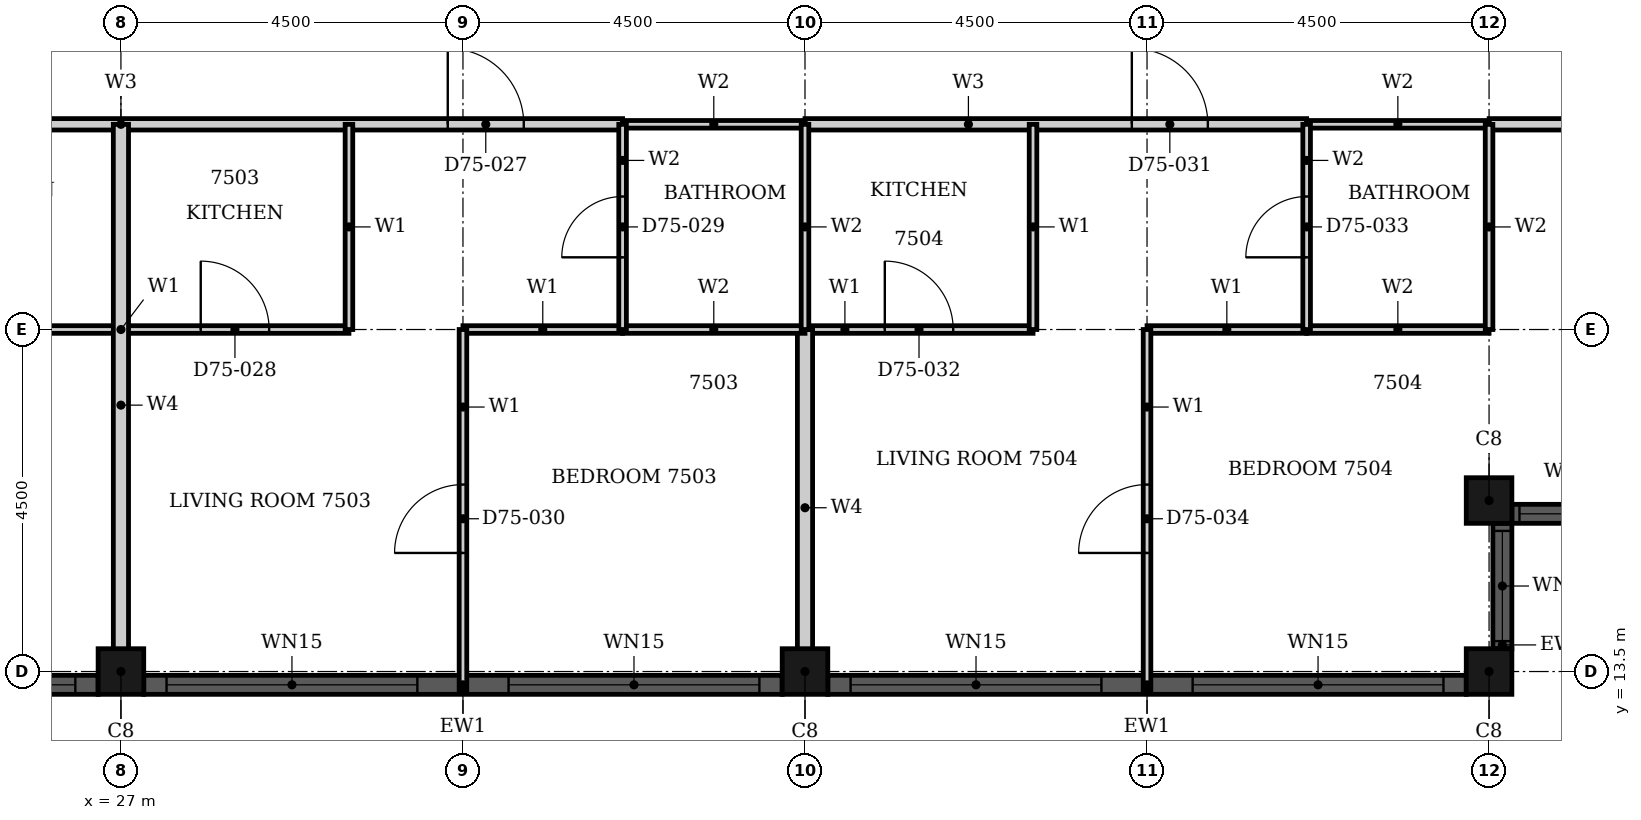
"""IFC4 building model, lengths in metres.
Left out: names, types, materials, properties, quantities, classifications, styles, units other than length and angle.
Written with IfcOpenShell. Run it as: python <this file> out.ifc"""

import sys

from ifc_helpers import new_model, si_unit, direction, frame, frame_2d, origin, origin_2d, place, context, subcontext, project, spatial, rectangle, hollow_rectangle, extrude, element, fill, save


model = new_model("IFC4")
c1 = context("Model", 3, precision=1e-05, world=origin(), true_north=direction((0.0, 1.0)))
c2 = subcontext(c1, "Body", "Model", "MODEL_VIEW")
j1 = project(units=[si_unit("LENGTHUNIT", "METRE"), si_unit("PLANEANGLEUNIT", "RADIAN")], contexts=[c1])
p1 = place(None, origin())
s1 = spatial("IfcSite", under=j1, at=p1, CompositionType="ELEMENT")
p2 = place(p1, origin())
s2 = spatial("IfcBuilding", under=s1, at=p2, CompositionType="ELEMENT")
p3 = place(p2, frame((0.0, 0.0, 294.5)))
s3 = spatial("IfcBuildingStorey", under=s2, at=p3, CompositionType="ELEMENT", Elevation=294.5)
for number, where, z_axis, x_axis in (
    (1, (45.0, 13.5, 0.0), (0.0, 0.0, 1.0), (1.0, 0.0, 0.0)),
    (2, (45.0, 15.75, 0.0), (0.0, 0.0, 1.0), (1.0, 0.0, 0.0)),
    (3, (27.0, 13.5, 0.0), (0.0, 0.0, 1.0), (1.0, 0.0, 0.0)),
    (4, (36.0, 13.5, 0.0), (0.0, 0.0, 1.0), (1.0, 0.0, 0.0)),
):
    element("IfcColumn", number, at=place(p3, frame(where, z_axis=z_axis, x_axis=x_axis)), inside=s3, PredefinedType="COLUMN", context=c2, shape_type="SweptSolid", body=[
        extrude(hollow_rectangle(XDim=0.6, YDim=0.6, WallThickness=0.02, at=origin_2d()), origin(), (0.0, 0.0, 1.0), 3.7),
    ])
p4 = place(p3, frame((45.175, 13.8, 0.0), z_axis=(0.0, 0.0, 1.0), x_axis=(0.0, 1.0, 0.0)))
e5 = element("IfcWall", 5, at=p4, inside=s3, PredefinedType="SOLIDWALL", context=c2, shape_type="SweptSolid", body=[
    extrude(rectangle(XDim=1.65, YDim=0.25, at=frame_2d((0.825, 0.0))), origin(), (0.0, 0.0, 1.0), 3.7),
])
p5 = place(p4, frame((0.1, 0.0, 0.9)))
e6 = element("IfcOpeningElement", 6, at=p5, cuts=e5, PredefinedType="OPENING", context=c2, shape_type="SweptSolid", body=[
    extrude(rectangle(XDim=1.45, YDim=1.85, at=frame_2d((0.725, 0.925))), frame((0.0, 0.135, 0.0), z_axis=(0.0, -1.0, 0.0), x_axis=(1.0, 0.0, 0.0)), (0.0, 0.0, 1.0), 0.27),
])
p6 = place(p3, frame((45.3, 15.575, 0.0), z_axis=(0.0, 0.0, 1.0), x_axis=(1.0, 0.0, 0.0)))
e7 = element("IfcWall", 7, at=p6, inside=s3, PredefinedType="SOLIDWALL", context=c2, shape_type="SweptSolid", body=[
    extrude(rectangle(XDim=1.65, YDim=0.25, at=frame_2d((0.825, 0.0))), origin(), (0.0, 0.0, 1.0), 3.7),
])
p7 = place(p6, frame((0.1, 0.0, 0.9)))
e8 = element("IfcOpeningElement", 8, at=p7, cuts=e7, PredefinedType="OPENING", context=c2, shape_type="SweptSolid", body=[
    extrude(rectangle(XDim=1.45, YDim=1.85, at=frame_2d((0.725, 0.925))), frame((0.0, 0.135, 0.0), z_axis=(0.0, -1.0, 0.0), x_axis=(1.0, 0.0, 0.0)), (0.0, 0.0, 1.0), 0.27),
])
p8 = place(p3, frame((18.3, 13.325, 0.0), z_axis=(0.0, 0.0, 1.0), x_axis=(1.0, 0.0, 0.0)))
e9 = element("IfcWall", 9, at=p8, inside=s3, PredefinedType="SOLIDWALL", context=c2, shape_type="SweptSolid", body=[
    extrude(rectangle(XDim=8.4, YDim=0.25, at=frame_2d((4.2, 0.0))), origin(), (0.0, 0.0, 1.0), 3.7),
])
p9 = place(p8, frame((0.3, 0.0, 0.45)))
e10 = element("IfcOpeningElement", 10, at=p9, cuts=e9, PredefinedType="OPENING", context=c2, shape_type="SweptSolid", body=[
    extrude(rectangle(XDim=3.3, YDim=2.3, at=frame_2d((1.65, 1.15))), frame((0.0, 0.135, 0.0), z_axis=(0.0, -1.0, 0.0), x_axis=(1.0, 0.0, 0.0)), (0.0, 0.0, 1.0), 0.27),
])
p10 = place(p8, frame((4.8, 0.0, 0.45)))
e11 = element("IfcOpeningElement", 11, at=p10, cuts=e9, PredefinedType="OPENING", context=c2, shape_type="SweptSolid", body=[
    extrude(rectangle(XDim=3.3, YDim=2.3, at=frame_2d((1.65, 1.15))), frame((0.0, 0.135, 0.0), z_axis=(0.0, -1.0, 0.0), x_axis=(1.0, 0.0, 0.0)), (0.0, 0.0, 1.0), 0.27),
])
p11 = place(p3, frame((27.3, 13.325, 0.0), z_axis=(0.0, 0.0, 1.0), x_axis=(1.0, 0.0, 0.0)))
e12 = element("IfcWall", 12, at=p11, inside=s3, PredefinedType="SOLIDWALL", context=c2, shape_type="SweptSolid", body=[
    extrude(rectangle(XDim=8.4, YDim=0.25, at=frame_2d((4.2, 0.0))), origin(), (0.0, 0.0, 1.0), 3.7),
])
p12 = place(p11, frame((0.3, 0.0, 0.45)))
e13 = element("IfcOpeningElement", 13, at=p12, cuts=e12, PredefinedType="OPENING", context=c2, shape_type="SweptSolid", body=[
    extrude(rectangle(XDim=3.3, YDim=2.3, at=frame_2d((1.65, 1.15))), frame((0.0, 0.135, 0.0), z_axis=(0.0, -1.0, 0.0), x_axis=(1.0, 0.0, 0.0)), (0.0, 0.0, 1.0), 0.27),
])
p13 = place(p11, frame((4.8, 0.0, 0.45)))
e14 = element("IfcOpeningElement", 14, at=p13, cuts=e12, PredefinedType="OPENING", context=c2, shape_type="SweptSolid", body=[
    extrude(rectangle(XDim=3.3, YDim=2.3, at=frame_2d((1.65, 1.15))), frame((0.0, 0.135, 0.0), z_axis=(0.0, -1.0, 0.0), x_axis=(1.0, 0.0, 0.0)), (0.0, 0.0, 1.0), 0.27),
])
p14 = place(p3, frame((36.3, 13.325, 0.0), z_axis=(0.0, 0.0, 1.0), x_axis=(1.0, 0.0, 0.0)))
e15 = element("IfcWall", 15, at=p14, inside=s3, PredefinedType="SOLIDWALL", context=c2, shape_type="SweptSolid", body=[
    extrude(rectangle(XDim=8.4, YDim=0.25, at=frame_2d((4.2, 0.0))), origin(), (0.0, 0.0, 1.0), 3.7),
])
p15 = place(p14, frame((0.3, 0.0, 0.45)))
e16 = element("IfcOpeningElement", 16, at=p15, cuts=e15, PredefinedType="OPENING", context=c2, shape_type="SweptSolid", body=[
    extrude(rectangle(XDim=3.3, YDim=2.3, at=frame_2d((1.65, 1.15))), frame((0.0, 0.135, 0.0), z_axis=(0.0, -1.0, 0.0), x_axis=(1.0, 0.0, 0.0)), (0.0, 0.0, 1.0), 0.27),
])
p16 = place(p14, frame((4.8, 0.0, 0.45)))
e17 = element("IfcOpeningElement", 17, at=p16, cuts=e15, PredefinedType="OPENING", context=c2, shape_type="SweptSolid", body=[
    extrude(rectangle(XDim=3.3, YDim=2.3, at=frame_2d((1.65, 1.15))), frame((0.0, 0.135, 0.0), z_axis=(0.0, -1.0, 0.0), x_axis=(1.0, 0.0, 0.0)), (0.0, 0.0, 1.0), 0.27),
])
p17 = place(p3, frame((20.4, 20.7, 0.0), z_axis=(0.0, 0.0, 1.0), x_axis=(1.0, 0.0, 0.0)))
e18 = element("IfcWall", 18, at=p17, inside=s3, PredefinedType="PARTITIONING", context=c2, shape_type="SweptSolid", body=[
    extrude(rectangle(XDim=13.2, YDim=0.15, at=frame_2d((6.6, 0.0))), origin(), (0.0, 0.0, 1.0), 3.4),
])
p18 = place(p17, frame((1.3, 0.0, 0.0)))
e19 = element("IfcOpeningElement", 19, at=p18, cuts=e18, PredefinedType="OPENING", context=c2, shape_type="SweptSolid", body=[
    extrude(rectangle(XDim=1.0, YDim=2.2, at=frame_2d((0.5, 1.1))), frame((0.0, 0.085, 0.0), z_axis=(0.0, -1.0, 0.0), x_axis=(1.0, 0.0, 0.0)), (0.0, 0.0, 1.0), 0.17),
])
p19 = place(p17, frame((10.9, 0.0, 0.0)))
e20 = element("IfcOpeningElement", 20, at=p19, cuts=e18, PredefinedType="OPENING", context=c2, shape_type="SweptSolid", body=[
    extrude(rectangle(XDim=1.0, YDim=2.2, at=frame_2d((0.5, 1.1))), frame((0.0, 0.085, 0.0), z_axis=(0.0, -1.0, 0.0), x_axis=(1.0, 0.0, 0.0)), (0.0, 0.0, 1.0), 0.17),
])
p20 = place(p3, frame((45.001, 20.7, 0.0), z_axis=(0.0, 0.0, 1.0), x_axis=(1.0, 0.0, 0.0)))
e21 = element("IfcWall", 21, at=p20, inside=s3, PredefinedType="PARTITIONING", context=c2, shape_type="SweptSolid", body=[
    extrude(rectangle(XDim=4.549, YDim=0.15, at=frame_2d((2.274, 0.0))), origin(), (0.0, 0.0, 1.0), 3.4),
])
p21 = place(p3, frame((36.0, 20.7, 0.0), z_axis=(0.0, 0.0, 1.0), x_axis=(1.0, 0.0, 0.0)))
e22 = element("IfcWall", 22, at=p21, inside=s3, PredefinedType="PARTITIONING", context=c2, shape_type="SweptSolid", body=[
    extrude(rectangle(XDim=6.6, YDim=0.15, at=frame_2d((3.3, 0.0))), origin(), (0.0, 0.0, 1.0), 3.4),
])
p22 = place(p21, frame((4.3, 0.0, 0.0)))
e23 = element("IfcOpeningElement", 23, at=p22, cuts=e22, PredefinedType="OPENING", context=c2, shape_type="SweptSolid", body=[
    extrude(rectangle(XDim=1.0, YDim=2.2, at=frame_2d((0.5, 1.1))), frame((0.0, 0.085, 0.0), z_axis=(0.0, -1.0, 0.0), x_axis=(1.0, 0.0, 0.0)), (0.0, 0.0, 1.0), 0.17),
])
p23 = place(p3, frame((24.0, 18.0, 0.0), z_axis=(0.0, 0.0, 1.0), x_axis=(1.0, 0.0, 0.0)))
e24 = element("IfcWall", 24, at=p23, inside=s3, PredefinedType="PARTITIONING", context=c2, shape_type="SweptSolid", body=[
    extrude(rectangle(XDim=6.0, YDim=0.1, at=frame_2d((3.0, 0.0))), origin(), (0.0, 0.0, 1.0), 3.4),
])
p24 = place(p23, frame((1.05, 0.0, 0.0)))
e25 = element("IfcOpeningElement", 25, at=p24, cuts=e24, PredefinedType="OPENING", context=c2, shape_type="SweptSolid", body=[
    extrude(rectangle(XDim=0.9, YDim=2.1, at=frame_2d((0.45, 1.05))), frame((0.0, 0.06, 0.0), z_axis=(0.0, -1.0, 0.0), x_axis=(1.0, 0.0, 0.0)), (0.0, 0.0, 1.0), 0.12),
])
p25 = place(p23, frame((4.05, 0.0, 0.0)))
e26 = element("IfcOpeningElement", 26, at=p25, cuts=e24, PredefinedType="OPENING", context=c2, shape_type="SweptSolid", body=[
    extrude(rectangle(XDim=0.9, YDim=2.1, at=frame_2d((0.45, 1.05))), frame((0.0, 0.06, 0.0), z_axis=(0.0, -1.0, 0.0), x_axis=(1.0, 0.0, 0.0)), (0.0, 0.0, 1.0), 0.12),
])
for number, where, z_axis, x_axis in (
    (27, (31.5, 18.0, 0.0), (0.0, 0.0, 1.0), (1.0, 0.0, 0.0)),
    (28, (40.5, 18.0, 0.0), (0.0, 0.0, 1.0), (1.0, 0.0, 0.0)),
):
    element("IfcWall", number, at=place(p3, frame(where, z_axis=z_axis, x_axis=x_axis)), inside=s3, PredefinedType="PARTITIONING", context=c2, shape_type="SweptSolid", body=[
        extrude(rectangle(XDim=2.1, YDim=0.1, at=frame_2d((1.05, 0.0))), origin(), (0.0, 0.0, 1.0), 3.4),
    ])
p26 = place(p3, frame((36.0, 18.0, 0.0), z_axis=(0.0, 0.0, 1.0), x_axis=(1.0, 0.0, 0.0)))
e29 = element("IfcWall", 29, at=p26, inside=s3, PredefinedType="PARTITIONING", context=c2, shape_type="SweptSolid", body=[
    extrude(rectangle(XDim=3.0, YDim=0.1, at=frame_2d((1.5, 0.0))), origin(), (0.0, 0.0, 1.0), 3.4),
])
p27 = place(p26, frame((1.05, 0.0, 0.0)))
e30 = element("IfcOpeningElement", 30, at=p27, cuts=e29, PredefinedType="OPENING", context=c2, shape_type="SweptSolid", body=[
    extrude(rectangle(XDim=0.9, YDim=2.1, at=frame_2d((0.45, 1.05))), frame((0.0, 0.06, 0.0), z_axis=(0.0, -1.0, 0.0), x_axis=(1.0, 0.0, 0.0)), (0.0, 0.0, 1.0), 0.12),
])
p28 = place(p3, frame((30.0, 18.0, 0.0), z_axis=(0.0, 0.0, 1.0), x_axis=(0.0, 1.0, 0.0)))
e31 = element("IfcWall", 31, at=p28, inside=s3, PredefinedType="PARTITIONING", context=c2, shape_type="SweptSolid", body=[
    extrude(rectangle(XDim=2.7, YDim=0.1, at=frame_2d((1.35, 0.0))), origin(), (0.0, 0.0, 1.0), 3.4),
])
p29 = place(p3, frame((31.5, 13.26, 0.0), z_axis=(0.0, 0.0, 1.0), x_axis=(0.0, 1.0, 0.0)))
e32 = element("IfcWall", 32, at=p29, inside=s3, PredefinedType="PARTITIONING", context=c2, shape_type="SweptSolid", body=[
    extrude(rectangle(XDim=4.74, YDim=0.1, at=frame_2d((2.37, 0.0))), origin(), (0.0, 0.0, 1.0), 3.4),
])
p30 = place(p29, frame((1.8, 0.0, 0.0)))
e33 = element("IfcOpeningElement", 33, at=p30, cuts=e32, PredefinedType="OPENING", context=c2, shape_type="SweptSolid", body=[
    extrude(rectangle(XDim=0.9, YDim=2.1, at=frame_2d((0.45, 1.05))), frame((0.0, 0.06, 0.0), z_axis=(0.0, -1.0, 0.0), x_axis=(1.0, 0.0, 0.0)), (0.0, 0.0, 1.0), 0.12),
])
p31 = place(p3, frame((39.0, 18.0, 0.0), z_axis=(0.0, 0.0, 1.0), x_axis=(0.0, 1.0, 0.0)))
e34 = element("IfcWall", 34, at=p31, inside=s3, PredefinedType="PARTITIONING", context=c2, shape_type="SweptSolid", body=[
    extrude(rectangle(XDim=2.7, YDim=0.1, at=frame_2d((1.35, 0.0))), origin(), (0.0, 0.0, 1.0), 3.4),
])
p32 = place(p3, frame((40.5, 13.26, 0.0), z_axis=(0.0, 0.0, 1.0), x_axis=(0.0, 1.0, 0.0)))
e35 = element("IfcWall", 35, at=p32, inside=s3, PredefinedType="PARTITIONING", context=c2, shape_type="SweptSolid", body=[
    extrude(rectangle(XDim=4.74, YDim=0.1, at=frame_2d((2.37, 0.0))), origin(), (0.0, 0.0, 1.0), 3.4),
])
p33 = place(p32, frame((1.8, 0.0, 0.0)))
e36 = element("IfcOpeningElement", 36, at=p33, cuts=e35, PredefinedType="OPENING", context=c2, shape_type="SweptSolid", body=[
    extrude(rectangle(XDim=0.9, YDim=2.1, at=frame_2d((0.45, 1.05))), frame((0.0, 0.06, 0.0), z_axis=(0.0, -1.0, 0.0), x_axis=(1.0, 0.0, 0.0)), (0.0, 0.0, 1.0), 0.12),
])
p34 = place(p3, frame((27.0, 13.31, 0.0), z_axis=(0.0, 0.0, 1.0), x_axis=(0.0, 1.0, 0.0)))
e37 = element("IfcWall", 37, at=p34, inside=s3, PredefinedType="PARTITIONING", context=c2, shape_type="SweptSolid", body=[
    extrude(rectangle(XDim=7.39, YDim=0.2, at=frame_2d((3.695, 0.0))), origin(), (0.0, 0.0, 1.0), 3.4),
])
p35 = place(p3, frame((36.0, 13.31, 0.0), z_axis=(0.0, 0.0, 1.0), x_axis=(0.0, 1.0, 0.0)))
e38 = element("IfcWall", 38, at=p35, inside=s3, PredefinedType="PARTITIONING", context=c2, shape_type="SweptSolid", body=[
    extrude(rectangle(XDim=4.69, YDim=0.2, at=frame_2d((2.345, 0.0))), origin(), (0.0, 0.0, 1.0), 3.4),
])
for number, where, z_axis, x_axis in (
    (39, (33.6, 18.0, 0.0), (0.0, 0.0, 1.0), (1.0, 0.0, 0.0)),
    (40, (42.6, 18.0, 0.0), (0.0, 0.0, 1.0), (1.0, 0.0, 0.0)),
    (41, (33.6, 20.7, 0.0), (0.0, 0.0, 1.0), (1.0, 0.0, 0.0)),
    (42, (42.6, 20.7, 0.0), (0.0, 0.0, 1.0), (1.0, 0.0, 0.0)),
):
    element("IfcWall", number, at=place(p3, frame(where, z_axis=z_axis, x_axis=x_axis)), inside=s3, PredefinedType="PARTITIONING", context=c2, shape_type="SweptSolid", body=[
        extrude(rectangle(XDim=2.4, YDim=0.1, at=frame_2d((1.2, 0.0))), origin(), (0.0, 0.0, 1.0), 3.4),
    ])
p36 = place(p3, frame((33.6, 18.0, 0.0), z_axis=(0.0, 0.0, 1.0), x_axis=(0.0, 1.0, 0.0)))
e43 = element("IfcWall", 43, at=p36, inside=s3, PredefinedType="PARTITIONING", context=c2, shape_type="SweptSolid", body=[
    extrude(rectangle(XDim=2.7, YDim=0.1, at=frame_2d((1.35, 0.0))), origin(), (0.0, 0.0, 1.0), 3.4),
])
p37 = place(p36, frame((0.95, 0.0, 0.0)))
e44 = element("IfcOpeningElement", 44, at=p37, cuts=e43, PredefinedType="OPENING", context=c2, shape_type="SweptSolid", body=[
    extrude(rectangle(XDim=0.8, YDim=2.1, at=frame_2d((0.4, 1.05))), frame((0.0, 0.06, 0.0), z_axis=(0.0, -1.0, 0.0), x_axis=(1.0, 0.0, 0.0)), (0.0, 0.0, 1.0), 0.12),
])
p38 = place(p3, frame((36.0, 18.0, 0.0), z_axis=(0.0, 0.0, 1.0), x_axis=(0.0, 1.0, 0.0)))
e45 = element("IfcWall", 45, at=p38, inside=s3, PredefinedType="PARTITIONING", context=c2, shape_type="SweptSolid", body=[
    extrude(rectangle(XDim=2.7, YDim=0.1, at=frame_2d((1.35, 0.0))), origin(), (0.0, 0.0, 1.0), 3.4),
])
p39 = place(p3, frame((42.6, 18.0, 0.0), z_axis=(0.0, 0.0, 1.0), x_axis=(0.0, 1.0, 0.0)))
e46 = element("IfcWall", 46, at=p39, inside=s3, PredefinedType="PARTITIONING", context=c2, shape_type="SweptSolid", body=[
    extrude(rectangle(XDim=2.7, YDim=0.1, at=frame_2d((1.35, 0.0))), origin(), (0.0, 0.0, 1.0), 3.4),
])
p40 = place(p39, frame((0.95, 0.0, 0.0)))
e47 = element("IfcOpeningElement", 47, at=p40, cuts=e46, PredefinedType="OPENING", context=c2, shape_type="SweptSolid", body=[
    extrude(rectangle(XDim=0.8, YDim=2.1, at=frame_2d((0.4, 1.05))), frame((0.0, 0.06, 0.0), z_axis=(0.0, -1.0, 0.0), x_axis=(1.0, 0.0, 0.0)), (0.0, 0.0, 1.0), 0.12),
])
p41 = place(p3, frame((45.0, 18.0, 0.0), z_axis=(0.0, 0.0, 1.0), x_axis=(0.0, 1.0, 0.0)))
e48 = element("IfcWall", 48, at=p41, inside=s3, PredefinedType="PARTITIONING", context=c2, shape_type="SweptSolid", body=[
    extrude(rectangle(XDim=2.699, YDim=0.1, at=frame_2d((1.35, 0.0))), origin(), (0.0, 0.0, 1.0), 3.4),
])
p42 = place(p5, origin())
e49 = element("IfcWindow", 49, at=p42, inside=s3, PartitioningType="SINGLE_PANEL", PredefinedType="WINDOW", context=c2, shape_type="SweptSolid", body=[
    extrude(rectangle(XDim=1.45, YDim=1.85, at=frame_2d((0.725, 0.925))), frame((0.0, 0.03, 0.0), z_axis=(0.0, -1.0, 0.0), x_axis=(1.0, 0.0, 0.0)), (0.0, 0.0, 1.0), 0.06),
])
fill(e6, e49)
p43 = place(p7, origin())
e50 = element("IfcWindow", 50, at=p43, inside=s3, PartitioningType="SINGLE_PANEL", PredefinedType="WINDOW", context=c2, shape_type="SweptSolid", body=[
    extrude(rectangle(XDim=1.45, YDim=1.85, at=frame_2d((0.725, 0.925))), frame((0.0, 0.03, 0.0), z_axis=(0.0, -1.0, 0.0), x_axis=(1.0, 0.0, 0.0)), (0.0, 0.0, 1.0), 0.06),
])
fill(e8, e50)
p44 = place(p10, origin())
e51 = element("IfcWindow", 51, at=p44, inside=s3, PartitioningType="SINGLE_PANEL", PredefinedType="WINDOW", context=c2, shape_type="SweptSolid", body=[
    extrude(rectangle(XDim=3.3, YDim=2.3, at=frame_2d((1.65, 1.15))), frame((0.0, 0.03, 0.0), z_axis=(0.0, -1.0, 0.0), x_axis=(1.0, 0.0, 0.0)), (0.0, 0.0, 1.0), 0.06),
])
fill(e11, e51)
p45 = place(p12, origin())
e52 = element("IfcWindow", 52, at=p45, inside=s3, PartitioningType="SINGLE_PANEL", PredefinedType="WINDOW", context=c2, shape_type="SweptSolid", body=[
    extrude(rectangle(XDim=3.3, YDim=2.3, at=frame_2d((1.65, 1.15))), frame((0.0, 0.03, 0.0), z_axis=(0.0, -1.0, 0.0), x_axis=(1.0, 0.0, 0.0)), (0.0, 0.0, 1.0), 0.06),
])
fill(e13, e52)
p46 = place(p13, origin())
e53 = element("IfcWindow", 53, at=p46, inside=s3, PartitioningType="SINGLE_PANEL", PredefinedType="WINDOW", context=c2, shape_type="SweptSolid", body=[
    extrude(rectangle(XDim=3.3, YDim=2.3, at=frame_2d((1.65, 1.15))), frame((0.0, 0.03, 0.0), z_axis=(0.0, -1.0, 0.0), x_axis=(1.0, 0.0, 0.0)), (0.0, 0.0, 1.0), 0.06),
])
fill(e14, e53)
p47 = place(p15, origin())
e54 = element("IfcWindow", 54, at=p47, inside=s3, PartitioningType="SINGLE_PANEL", PredefinedType="WINDOW", context=c2, shape_type="SweptSolid", body=[
    extrude(rectangle(XDim=3.3, YDim=2.3, at=frame_2d((1.65, 1.15))), frame((0.0, 0.03, 0.0), z_axis=(0.0, -1.0, 0.0), x_axis=(1.0, 0.0, 0.0)), (0.0, 0.0, 1.0), 0.06),
])
fill(e16, e54)
p48 = place(p16, origin())
e55 = element("IfcWindow", 55, at=p48, inside=s3, PartitioningType="SINGLE_PANEL", PredefinedType="WINDOW", context=c2, shape_type="SweptSolid", body=[
    extrude(rectangle(XDim=3.3, YDim=2.3, at=frame_2d((1.65, 1.15))), frame((0.0, 0.03, 0.0), z_axis=(0.0, -1.0, 0.0), x_axis=(1.0, 0.0, 0.0)), (0.0, 0.0, 1.0), 0.06),
])
fill(e17, e55)
p49 = place(p19, origin())
e56 = element("IfcDoor", 56, at=p49, inside=s3, OperationType="SINGLE_SWING_RIGHT", PredefinedType="DOOR", context=c2, shape_type="SweptSolid", body=[
    extrude(rectangle(XDim=1.0, YDim=2.2, at=frame_2d((0.5, 1.1))), frame((0.0, 0.025, 0.0), z_axis=(0.0, -1.0, 0.0), x_axis=(1.0, 0.0, 0.0)), (0.0, 0.0, 1.0), 0.05),
])
fill(e20, e56)
p50 = place(p25, origin())
e57 = element("IfcDoor", 57, at=p50, inside=s3, OperationType="SINGLE_SWING_RIGHT", PredefinedType="DOOR", context=c2, shape_type="SweptSolid", body=[
    extrude(rectangle(XDim=0.9, YDim=2.1, at=frame_2d((0.45, 1.05))), frame((0.0, 0.025, 0.0), z_axis=(0.0, -1.0, 0.0), x_axis=(1.0, 0.0, 0.0)), (0.0, 0.0, 1.0), 0.05),
])
fill(e26, e57)
p51 = place(p37, origin())
e58 = element("IfcDoor", 58, at=p51, inside=s3, OperationType="SINGLE_SWING_RIGHT", PredefinedType="DOOR", context=c2, shape_type="SweptSolid", body=[
    extrude(rectangle(XDim=0.8, YDim=2.1, at=frame_2d((0.4, 1.05))), frame((0.0, 0.025, 0.0), z_axis=(0.0, -1.0, 0.0), x_axis=(1.0, 0.0, 0.0)), (0.0, 0.0, 1.0), 0.05),
])
fill(e44, e58)
p52 = place(p30, origin())
e59 = element("IfcDoor", 59, at=p52, inside=s3, OperationType="SINGLE_SWING_LEFT", PredefinedType="DOOR", context=c2, shape_type="SweptSolid", body=[
    extrude(rectangle(XDim=0.9, YDim=2.1, at=frame_2d((0.45, 1.05))), frame((0.0, 0.025, 0.0), z_axis=(0.0, -1.0, 0.0), x_axis=(1.0, 0.0, 0.0)), (0.0, 0.0, 1.0), 0.05),
])
fill(e33, e59)
p53 = place(p22, origin())
e60 = element("IfcDoor", 60, at=p53, inside=s3, OperationType="SINGLE_SWING_LEFT", PredefinedType="DOOR", context=c2, shape_type="SweptSolid", body=[
    extrude(rectangle(XDim=1.0, YDim=2.2, at=frame_2d((0.5, 1.1))), frame((0.0, 0.025, 0.0), z_axis=(0.0, -1.0, 0.0), x_axis=(1.0, 0.0, 0.0)), (0.0, 0.0, 1.0), 0.05),
])
fill(e23, e60)
p54 = place(p27, origin())
e61 = element("IfcDoor", 61, at=p54, inside=s3, OperationType="SINGLE_SWING_LEFT", PredefinedType="DOOR", context=c2, shape_type="SweptSolid", body=[
    extrude(rectangle(XDim=0.9, YDim=2.1, at=frame_2d((0.45, 1.05))), frame((0.0, 0.025, 0.0), z_axis=(0.0, -1.0, 0.0), x_axis=(1.0, 0.0, 0.0)), (0.0, 0.0, 1.0), 0.05),
])
fill(e30, e61)
p55 = place(p40, origin())
e62 = element("IfcDoor", 62, at=p55, inside=s3, OperationType="SINGLE_SWING_LEFT", PredefinedType="DOOR", context=c2, shape_type="SweptSolid", body=[
    extrude(rectangle(XDim=0.8, YDim=2.1, at=frame_2d((0.4, 1.05))), frame((0.0, 0.025, 0.0), z_axis=(0.0, -1.0, 0.0), x_axis=(1.0, 0.0, 0.0)), (0.0, 0.0, 1.0), 0.05),
])
fill(e47, e62)
p56 = place(p33, origin())
e63 = element("IfcDoor", 63, at=p56, inside=s3, OperationType="SINGLE_SWING_RIGHT", PredefinedType="DOOR", context=c2, shape_type="SweptSolid", body=[
    extrude(rectangle(XDim=0.9, YDim=2.1, at=frame_2d((0.45, 1.05))), frame((0.0, 0.025, 0.0), z_axis=(0.0, -1.0, 0.0), x_axis=(1.0, 0.0, 0.0)), (0.0, 0.0, 1.0), 0.05),
])
fill(e36, e63)
save(model, sys.argv[1])
